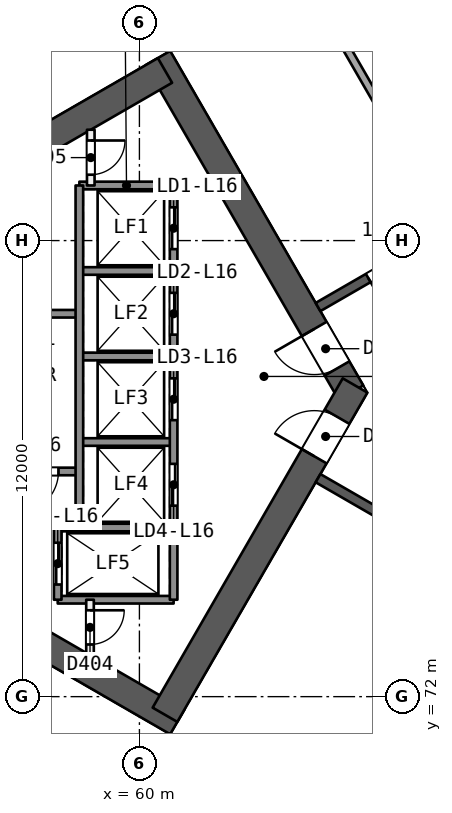
"""IFC4 building model, lengths in metres.
Left out: names, types, materials, properties, quantities, classifications, styles, units other than length and angle.
Written with IfcOpenShell. Run it as: python <this file> out.ifc"""

import sys

from ifc_helpers import new_model, si_unit, direction, frame, frame_2d, origin, place, context, subcontext, project, spatial, rectangle, extrude, element, fill, save


model = new_model("IFC4")
c1 = context("Model", 3, precision=1e-05, world=origin(), true_north=direction((0.0, 1.0)))
c2 = subcontext(c1, "Body", "Model", "MODEL_VIEW")
j1 = project(units=[si_unit("LENGTHUNIT", "METRE"), si_unit("PLANEANGLEUNIT", "RADIAN")], contexts=[c1])
p1 = place(None, origin())
s1 = spatial("IfcSite", under=j1, at=p1, CompositionType="ELEMENT")
p2 = place(p1, origin())
s2 = spatial("IfcBuilding", under=s1, at=p2, CompositionType="ELEMENT")
p3 = place(p2, frame((0.0, 0.0, 72.1)))
s3 = spatial("IfcBuildingStorey", under=s2, at=p3, CompositionType="ELEMENT", Elevation=72.1)
p4 = place(p3, frame((65.567, 80.0, 0.0), z_axis=(0.0, 0.0, 1.0), x_axis=(-0.499988615364, 0.866031976607, 0.0)))
e1 = element("IfcWall", 1, at=p4, inside=s3, PredefinedType="SHEAR", context=c2, shape_type="SweptSolid", body=[
    extrude(rectangle(XDim=10.163, YDim=0.75, at=frame_2d((5.082, 0.0))), origin(), (0.0, 0.0, 1.0), 3.7),
])
p5 = place(p4, frame((0.733, 0.0, 0.0)))
e2 = element("IfcOpeningElement", 2, at=p5, cuts=e1, PredefinedType="OPENING", context=c2, shape_type="SweptSolid", body=[
    extrude(rectangle(XDim=1.2, YDim=2.1, at=frame_2d((0.6, 1.05))), frame((0.0, 0.385, 0.0), z_axis=(0.0, -1.0, 0.0), x_axis=(1.0, 0.0, 0.0)), (0.0, 0.0, 1.0), 0.771),
])
p6 = place(p3, frame((60.673, 88.477, 0.0), z_axis=(0.0, 0.0, 1.0), x_axis=(-0.8660248072, -0.500001033313, 0.0)))
e3 = element("IfcWall", 3, at=p6, inside=s3, PredefinedType="SHEAR", context=c2, shape_type="SweptSolid", body=[
    extrude(rectangle(XDim=13.958, YDim=0.75, at=frame_2d((6.979, 0.0))), origin(), (0.0, 0.0, 1.0), 3.7),
])
p7 = place(p3, frame((48.772, 78.394, 0.0), z_axis=(0.0, 0.0, 1.0), x_axis=(0.866028339916, -0.499994914436, 0.0)))
e4 = element("IfcWall", 4, at=p7, inside=s3, PredefinedType="SHEAR", context=c2, shape_type="SweptSolid", body=[
    extrude(rectangle(XDim=14.117, YDim=0.75, at=frame_2d((7.059, 0.0))), origin(), (0.0, 0.0, 1.0), 3.7),
])
p8 = place(p3, frame((60.673, 71.523, 0.0), z_axis=(0.0, 0.0, 1.0), x_axis=(0.499997052475, 0.866027105532, 0.0)))
e5 = element("IfcWall", 5, at=p8, inside=s3, PredefinedType="SHEAR", context=c2, shape_type="SweptSolid", body=[
    extrude(rectangle(XDim=10.005, YDim=0.75, at=frame_2d((5.002, 0.0))), origin(), (0.0, 0.0, 1.0), 3.7),
])
p9 = place(p8, frame((7.855, 0.0, 0.0)))
e6 = element("IfcOpeningElement", 6, at=p9, cuts=e5, PredefinedType="OPENING", context=c2, shape_type="SweptSolid", body=[
    extrude(rectangle(XDim=1.2, YDim=2.1, at=frame_2d((0.6, 1.05))), frame((0.0, 0.385, 0.0), z_axis=(0.0, -1.0, 0.0), x_axis=(1.0, 0.0, 0.0)), (0.0, 0.0, 1.0), 0.771),
])
p10 = place(p3, frame((78.2, 90.046, 0.0), z_axis=(0.0, 0.0, 1.0), x_axis=(-0.866026492143, -0.499998114903, 0.0)))
e7 = element("IfcWall", 7, at=p10, inside=s3, PredefinedType="SHEAR", context=c2, shape_type="SweptSolid", body=[
    extrude(rectangle(XDim=15.588, YDim=0.25, at=frame_2d((7.794, 0.0))), origin(), (0.0, 0.0, 1.0), 3.2),
])
p11 = place(p10, frame((4.718, 0.0, 0.0)))
e8 = element("IfcOpeningElement", 8, at=p11, cuts=e7, PredefinedType="OPENING", context=c2, shape_type="SweptSolid", body=[
    extrude(rectangle(XDim=1.0, YDim=2.1, at=frame_2d((0.5, 1.05))), frame((0.0, 0.135, 0.0), z_axis=(0.0, -1.0, 0.0), x_axis=(1.0, 0.0, 0.0)), (0.0, 0.0, 1.0), 0.271),
])
p12 = place(p10, frame((9.785, 0.0, 0.0)))
e9 = element("IfcOpeningElement", 9, at=p12, cuts=e7, PredefinedType="OPENING", context=c2, shape_type="SweptSolid", body=[
    extrude(rectangle(XDim=1.1, YDim=2.1, at=frame_2d((0.55, 1.05))), frame((0.0, 0.135, 0.0), z_axis=(0.0, -1.0, 0.0), x_axis=(1.0, 0.0, 0.0)), (0.0, 0.0, 1.0), 0.271),
])
p13 = place(p10, frame((13.062, 0.0, 0.0)))
e10 = element("IfcOpeningElement", 10, at=p13, cuts=e7, PredefinedType="OPENING", context=c2, shape_type="SweptSolid", body=[
    extrude(rectangle(XDim=1.0, YDim=2.1, at=frame_2d((0.5, 1.05))), frame((0.0, 0.135, 0.0), z_axis=(0.0, -1.0, 0.0), x_axis=(1.0, 0.0, 0.0)), (0.0, 0.0, 1.0), 0.271),
])
p14 = place(p3, frame((64.7, 77.748, 0.0), z_axis=(0.0, 0.0, 1.0), x_axis=(0.866026492143, -0.499998114903, 0.0)))
e11 = element("IfcWall", 11, at=p14, inside=s3, PredefinedType="SHEAR", context=c2, shape_type="SweptSolid", body=[
    extrude(rectangle(XDim=15.588, YDim=0.25, at=frame_2d((7.794, 0.0))), origin(), (0.0, 0.0, 1.0), 3.2),
])
p15 = place(p14, frame((2.306, 0.0, 0.0)))
e12 = element("IfcOpeningElement", 12, at=p15, cuts=e11, PredefinedType="OPENING", context=c2, shape_type="SweptSolid", body=[
    extrude(rectangle(XDim=1.0, YDim=2.1, at=frame_2d((0.5, 1.05))), frame((0.0, 0.135, 0.0), z_axis=(0.0, -1.0, 0.0), x_axis=(1.0, 0.0, 0.0)), (0.0, 0.0, 1.0), 0.271),
])
p16 = place(p14, frame((8.003, 0.0, 0.0)))
e13 = element("IfcOpeningElement", 13, at=p16, cuts=e11, PredefinedType="OPENING", context=c2, shape_type="SweptSolid", body=[
    extrude(rectangle(XDim=1.1, YDim=2.1, at=frame_2d((0.55, 1.05))), frame((0.0, 0.135, 0.0), z_axis=(0.0, -1.0, 0.0), x_axis=(1.0, 0.0, 0.0)), (0.0, 0.0, 1.0), 0.271),
])
p17 = place(p14, frame((9.871, 0.0, 0.0)))
e14 = element("IfcOpeningElement", 14, at=p17, cuts=e11, PredefinedType="OPENING", context=c2, shape_type="SweptSolid", body=[
    extrude(rectangle(XDim=1.0, YDim=2.1, at=frame_2d((0.5, 1.05))), frame((0.0, 0.135, 0.0), z_axis=(0.0, -1.0, 0.0), x_axis=(1.0, 0.0, 0.0)), (0.0, 0.0, 1.0), 0.271),
])
p18 = place(p3, frame((61.51, 95.884, 0.0), z_axis=(0.0, 0.0, 1.0), x_axis=(0.499993171696, -0.866029346071, 0.0)))
e15 = element("IfcWall", 15, at=p18, inside=s3, PredefinedType="PARTITIONING", context=c2, shape_type="SweptSolid", body=[
    extrude(rectangle(XDim=13.401, YDim=0.2, at=frame_2d((6.701, 0.0))), origin(), (0.0, 0.0, 1.0), 3.2),
])
p19 = place(p3, frame((62.859, 63.337, 0.0), z_axis=(0.0, 0.0, 1.0), x_axis=(0.500016660921, 0.866015784384, 0.0)))
e16 = element("IfcWall", 16, at=p19, inside=s3, PredefinedType="PARTITIONING", context=c2, shape_type="SweptSolid", body=[
    extrude(rectangle(XDim=9.338, YDim=0.2, at=frame_2d((4.669, 0.0))), origin(), (0.0, 0.0, 1.0), 3.2),
])
p20 = place(p3, frame((66.099, 61.466, 0.0), z_axis=(0.0, 0.0, 1.0), x_axis=(0.500006835139, 0.866021457479, 0.0)))
e17 = element("IfcWall", 17, at=p20, inside=s3, PredefinedType="PARTITIONING", context=c2, shape_type="SweptSolid", body=[
    extrude(rectangle(XDim=13.401, YDim=0.2, at=frame_2d((6.701, 0.0))), origin(), (0.0, 0.0, 1.0), 3.2),
])
p21 = place(p3, frame((38.962, 83.038, 0.0), z_axis=(0.0, 0.0, 1.0), x_axis=(0.866024483997, 0.500001593116, 0.0)))
e18 = element("IfcWall", 18, at=p21, inside=s3, PredefinedType="SOLIDWALL", context=c2, shape_type="SweptSolid", body=[
    extrude(rectangle(XDim=59.381, YDim=0.3, at=frame_2d((29.69, 0.0))), origin(), (0.0, 0.0, 1.0), 3.2),
])
p22 = place(p21, frame((27.399, 0.0, 0.0)))
e19 = element("IfcOpeningElement", 19, at=p22, cuts=e18, PredefinedType="OPENING", context=c2, shape_type="SweptSolid", body=[
    extrude(rectangle(XDim=2.4, YDim=2.4, at=frame_2d((1.2, 1.2))), frame((0.0, 0.161, 0.0), z_axis=(0.0, -1.0, 0.0), x_axis=(1.0, 0.0, 0.0)), (0.0, 0.0, 1.0), 0.321),
])
p23 = place(p21, frame((22.723, 0.0, 0.0)))
e20 = element("IfcOpeningElement", 20, at=p23, cuts=e18, PredefinedType="OPENING", context=c2, shape_type="SweptSolid", body=[
    extrude(rectangle(XDim=2.4, YDim=2.4, at=frame_2d((1.2, 1.2))), frame((0.0, 0.161, 0.0), z_axis=(0.0, -1.0, 0.0), x_axis=(1.0, 0.0, 0.0)), (0.0, 0.0, 1.0), 0.321),
])
p24 = place(p21, frame((10.887, 0.0, 0.0)))
e21 = element("IfcOpeningElement", 21, at=p24, cuts=e18, PredefinedType="OPENING", context=c2, shape_type="SweptSolid", body=[
    extrude(rectangle(XDim=2.4, YDim=2.4, at=frame_2d((1.2, 1.2))), frame((0.0, 0.161, 0.0), z_axis=(0.0, -1.0, 0.0), x_axis=(1.0, 0.0, 0.0)), (0.0, 0.0, 1.0), 0.321),
])
p25 = place(p21, frame((44.158, 0.0, 0.0)))
e22 = element("IfcOpeningElement", 22, at=p25, cuts=e18, PredefinedType="OPENING", context=c2, shape_type="SweptSolid", body=[
    extrude(rectangle(XDim=2.4, YDim=2.4, at=frame_2d((1.2, 1.2))), frame((0.0, 0.161, 0.0), z_axis=(0.0, -1.0, 0.0), x_axis=(1.0, 0.0, 0.0)), (0.0, 0.0, 1.0), 0.321),
])
p26 = place(p3, frame((90.388, 47.271, 0.0), z_axis=(0.0, 0.0, 1.0), x_axis=(-0.866024483997, 0.500001593116, 0.0)))
e23 = element("IfcWall", 23, at=p26, inside=s3, PredefinedType="SOLIDWALL", context=c2, shape_type="SweptSolid", body=[
    extrude(rectangle(XDim=59.381, YDim=0.3, at=frame_2d((29.69, 0.0))), origin(), (0.0, 0.0, 1.0), 3.2),
])
p27 = place(p26, frame((28.802, 0.0, 0.0)))
e24 = element("IfcOpeningElement", 24, at=p27, cuts=e23, PredefinedType="OPENING", context=c2, shape_type="SweptSolid", body=[
    extrude(rectangle(XDim=2.4, YDim=2.4, at=frame_2d((1.2, 1.2))), frame((0.0, 0.161, 0.0), z_axis=(0.0, -1.0, 0.0), x_axis=(1.0, 0.0, 0.0)), (0.0, 0.0, 1.0), 0.321),
])
p28 = place(p26, frame((33.479, 0.0, 0.0)))
e25 = element("IfcOpeningElement", 25, at=p28, cuts=e23, PredefinedType="OPENING", context=c2, shape_type="SweptSolid", body=[
    extrude(rectangle(XDim=2.4, YDim=2.4, at=frame_2d((1.2, 1.2))), frame((0.0, 0.161, 0.0), z_axis=(0.0, -1.0, 0.0), x_axis=(1.0, 0.0, 0.0)), (0.0, 0.0, 1.0), 0.321),
])
p29 = place(p26, frame((46.066, 0.0, 0.0)))
e26 = element("IfcOpeningElement", 26, at=p29, cuts=e23, PredefinedType="OPENING", context=c2, shape_type="SweptSolid", body=[
    extrude(rectangle(XDim=2.4, YDim=2.4, at=frame_2d((1.2, 1.2))), frame((0.0, 0.161, 0.0), z_axis=(0.0, -1.0, 0.0), x_axis=(1.0, 0.0, 0.0)), (0.0, 0.0, 1.0), 0.321),
])
p30 = place(p26, frame((12.823, 0.0, 0.0)))
e27 = element("IfcOpeningElement", 27, at=p30, cuts=e23, PredefinedType="OPENING", context=c2, shape_type="SweptSolid", body=[
    extrude(rectangle(XDim=2.4, YDim=2.4, at=frame_2d((1.2, 1.2))), frame((0.0, 0.161, 0.0), z_axis=(0.0, -1.0, 0.0), x_axis=(1.0, 0.0, 0.0)), (0.0, 0.0, 1.0), 0.321),
])
for number, where, z_axis, x_axis in (
    (28, (60.9, 85.45, 0.0), (0.0, 0.0, 1.0), (-1.0, 0.0, 0.0)),
    (29, (60.9, 83.2, 0.0), (0.0, 0.0, 1.0), (-1.0, 0.0, 0.0)),
):
    element("IfcWall", number, at=place(p3, frame(where, z_axis=z_axis, x_axis=x_axis)), inside=s3, PredefinedType="SOLIDWALL", context=c2, shape_type="SweptSolid", body=[
        extrude(rectangle(XDim=2.48, YDim=0.2, at=frame_2d((1.24, 0.0))), origin(), (0.0, 0.0, 1.0), 3.2),
    ])
p31 = place(p3, frame((58.42, 82.075, 0.0), z_axis=(0.0, 0.0, 1.0), x_axis=(-1.0, 0.0, 0.0)))
e30 = element("IfcWall", 30, at=p31, inside=s3, PredefinedType="SOLIDWALL", context=c2, shape_type="SweptSolid", body=[
    extrude(rectangle(XDim=7.7, YDim=0.2, at=frame_2d((3.85, 0.0))), origin(), (0.0, 0.0, 1.0), 3.2),
])
for number, where, z_axis, x_axis in (
    (31, (60.9, 80.95, 0.0), (0.0, 0.0, 1.0), (-1.0, 0.0, 0.0)),
    (32, (60.9, 78.7, 0.0), (0.0, 0.0, 1.0), (-1.0, 0.0, 0.0)),
):
    element("IfcWall", number, at=place(p3, frame(where, z_axis=z_axis, x_axis=x_axis)), inside=s3, PredefinedType="SOLIDWALL", context=c2, shape_type="SweptSolid", body=[
        extrude(rectangle(XDim=2.48, YDim=0.2, at=frame_2d((1.24, 0.0))), origin(), (0.0, 0.0, 1.0), 3.2),
    ])
p32 = place(p3, frame((58.42, 77.925, 0.0), z_axis=(0.0, 0.0, 1.0), x_axis=(-1.0, 0.0, 0.0)))
e33 = element("IfcWall", 33, at=p32, inside=s3, PredefinedType="SOLIDWALL", context=c2, shape_type="SweptSolid", body=[
    extrude(rectangle(XDim=7.7, YDim=0.2, at=frame_2d((3.85, 0.0))), origin(), (0.0, 0.0, 1.0), 3.2),
])
p33 = place(p32, frame((0.55, 0.0, 0.0)))
e34 = element("IfcOpeningElement", 34, at=p33, cuts=e33, PredefinedType="OPENING", context=c2, shape_type="SweptSolid", body=[
    extrude(rectangle(XDim=1.1, YDim=2.1, at=frame_2d((0.55, 1.05))), frame((0.0, 0.11, 0.0), z_axis=(0.0, -1.0, 0.0), x_axis=(1.0, 0.0, 0.0)), (0.0, 0.0, 1.0), 0.221),
])
for number, where, z_axis, x_axis in (
    (35, (60.9, 76.45, 0.0), (0.0, 0.0, 1.0), (-1.0, 0.0, 0.0)),
    (36, (60.9, 74.55, 0.0), (0.0, 0.0, 1.0), (-1.0, 0.0, 0.0)),
):
    element("IfcWall", number, at=place(p3, frame(where, z_axis=z_axis, x_axis=x_axis)), inside=s3, PredefinedType="SOLIDWALL", context=c2, shape_type="SweptSolid", body=[
        extrude(rectangle(XDim=3.05, YDim=0.2, at=frame_2d((1.525, 0.0))), origin(), (0.0, 0.0, 1.0), 3.2),
    ])
p34 = place(p3, frame((60.9, 85.45, 0.0), z_axis=(0.0, 0.0, 1.0), x_axis=(0.0, -1.0, 0.0)))
e37 = element("IfcWall", 37, at=p34, inside=s3, PredefinedType="SOLIDWALL", context=c2, shape_type="SweptSolid", body=[
    extrude(rectangle(XDim=10.9, YDim=0.2, at=frame_2d((5.45, 0.0))), origin(), (0.0, 0.0, 1.0), 3.2),
])
p35 = place(p34, frame((0.575, 0.0, 0.0)))
e38 = element("IfcOpeningElement", 38, at=p35, cuts=e37, PredefinedType="OPENING", context=c2, shape_type="SweptSolid", body=[
    extrude(rectangle(XDim=1.1, YDim=2.1, at=frame_2d((0.55, 1.05))), frame((0.0, 0.11, 0.0), z_axis=(0.0, -1.0, 0.0), x_axis=(1.0, 0.0, 0.0)), (0.0, 0.0, 1.0), 0.221),
])
p36 = place(p34, frame((2.825, 0.0, 0.0)))
e39 = element("IfcOpeningElement", 39, at=p36, cuts=e37, PredefinedType="OPENING", context=c2, shape_type="SweptSolid", body=[
    extrude(rectangle(XDim=1.1, YDim=2.1, at=frame_2d((0.55, 1.05))), frame((0.0, 0.11, 0.0), z_axis=(0.0, -1.0, 0.0), x_axis=(1.0, 0.0, 0.0)), (0.0, 0.0, 1.0), 0.221),
])
p37 = place(p34, frame((5.075, 0.0, 0.0)))
e40 = element("IfcOpeningElement", 40, at=p37, cuts=e37, PredefinedType="OPENING", context=c2, shape_type="SweptSolid", body=[
    extrude(rectangle(XDim=1.1, YDim=2.1, at=frame_2d((0.55, 1.05))), frame((0.0, 0.11, 0.0), z_axis=(0.0, -1.0, 0.0), x_axis=(1.0, 0.0, 0.0)), (0.0, 0.0, 1.0), 0.221),
])
p38 = place(p34, frame((7.325, 0.0, 0.0)))
e41 = element("IfcOpeningElement", 41, at=p38, cuts=e37, PredefinedType="OPENING", context=c2, shape_type="SweptSolid", body=[
    extrude(rectangle(XDim=1.1, YDim=2.1, at=frame_2d((0.55, 1.05))), frame((0.0, 0.11, 0.0), z_axis=(0.0, -1.0, 0.0), x_axis=(1.0, 0.0, 0.0)), (0.0, 0.0, 1.0), 0.221),
])
p39 = place(p3, frame((58.72, 86.917, 0.0), z_axis=(0.0, 0.0, 1.0), x_axis=(0.0, -1.0, 0.0)))
e42 = element("IfcWall", 42, at=p39, inside=s3, PredefinedType="PARTITIONING", context=c2, shape_type="SweptSolid", body=[
    extrude(rectangle(XDim=1.467, YDim=0.2, at=frame_2d((0.733, 0.0))), origin(), (0.0, 0.0, 1.0), 3.2),
])
p40 = place(p39, frame((0.283, 0.0, 0.0)))
e43 = element("IfcOpeningElement", 43, at=p40, cuts=e42, PredefinedType="OPENING", context=c2, shape_type="SweptSolid", body=[
    extrude(rectangle(XDim=0.9, YDim=2.1, at=frame_2d((0.45, 1.05))), frame((0.0, 0.11, 0.0), z_axis=(0.0, -1.0, 0.0), x_axis=(1.0, 0.0, 0.0)), (0.0, 0.0, 1.0), 0.221),
])
p41 = place(p3, frame((58.7, 74.55, 0.0), z_axis=(0.0, 0.0, 1.0), x_axis=(0.0, -1.0, 0.0)))
e44 = element("IfcWall", 44, at=p41, inside=s3, PredefinedType="PARTITIONING", context=c2, shape_type="SweptSolid", body=[
    extrude(rectangle(XDim=1.455, YDim=0.2, at=frame_2d((0.728, 0.0))), origin(), (0.0, 0.0, 1.0), 3.2),
])
p42 = place(p41, frame((0.278, 0.0, 0.0)))
e45 = element("IfcOpeningElement", 45, at=p42, cuts=e44, PredefinedType="OPENING", context=c2, shape_type="SweptSolid", body=[
    extrude(rectangle(XDim=0.9, YDim=2.1, at=frame_2d((0.45, 1.05))), frame((0.0, 0.11, 0.0), z_axis=(0.0, -1.0, 0.0), x_axis=(1.0, 0.0, 0.0)), (0.0, 0.0, 1.0), 0.221),
])
p43 = place(p3, frame((58.42, 85.45, 0.0), z_axis=(0.0, 0.0, 1.0), x_axis=(0.0, -1.0, 0.0)))
e46 = element("IfcWall", 46, at=p43, inside=s3, PredefinedType="SOLIDWALL", context=c2, shape_type="SweptSolid", body=[
    extrude(rectangle(XDim=9.0, YDim=0.2, at=frame_2d((4.5, 0.0))), origin(), (0.0, 0.0, 1.0), 3.2),
])
p44 = place(p3, frame((57.85, 76.45, 0.0), z_axis=(0.0, 0.0, 1.0), x_axis=(0.0, -1.0, 0.0)))
e47 = element("IfcWall", 47, at=p44, inside=s3, PredefinedType="SOLIDWALL", context=c2, shape_type="SweptSolid", body=[
    extrude(rectangle(XDim=1.9, YDim=0.2, at=frame_2d((0.95, 0.0))), origin(), (0.0, 0.0, 1.0), 3.2),
])
p45 = place(p44, frame((0.4, 0.0, 0.0)))
e48 = element("IfcOpeningElement", 48, at=p45, cuts=e47, PredefinedType="OPENING", context=c2, shape_type="SweptSolid", body=[
    extrude(rectangle(XDim=1.1, YDim=2.1, at=frame_2d((0.55, 1.05))), frame((0.0, 0.11, 0.0), z_axis=(0.0, -1.0, 0.0), x_axis=(1.0, 0.0, 0.0)), (0.0, 0.0, 1.0), 0.221),
])
p46 = place(p13, origin())
e49 = element("IfcDoor", 49, at=p46, inside=s3, OperationType="SINGLE_SWING_RIGHT", PredefinedType="NOTDEFINED", context=c2, shape_type="SweptSolid", body=[
    extrude(rectangle(XDim=1.0, YDim=2.1, at=frame_2d((0.5, 1.05))), frame((0.0, 0.025, 0.0), z_axis=(0.0, -1.0, 0.0), x_axis=(1.0, 0.0, 0.0)), (0.0, 0.0, 1.0), 0.05),
])
fill(e10, e49)
p47 = place(p5, origin())
e50 = element("IfcDoor", 50, at=p47, inside=s3, OperationType="SINGLE_SWING_RIGHT", PredefinedType="NOTDEFINED", context=c2, shape_type="SweptSolid", body=[
    extrude(rectangle(XDim=1.2, YDim=2.1, at=frame_2d((0.6, 1.05))), frame((0.0, 0.025, 0.0), z_axis=(0.0, -1.0, 0.0), x_axis=(1.0, 0.0, 0.0)), (0.0, 0.0, 1.0), 0.05),
])
fill(e2, e50)
p48 = place(p9, origin())
e51 = element("IfcDoor", 51, at=p48, inside=s3, OperationType="SINGLE_SWING_LEFT", PredefinedType="NOTDEFINED", context=c2, shape_type="SweptSolid", body=[
    extrude(rectangle(XDim=1.2, YDim=2.1, at=frame_2d((0.6, 1.05))), frame((0.0, 0.025, 0.0), z_axis=(0.0, -1.0, 0.0), x_axis=(1.0, 0.0, 0.0)), (0.0, 0.0, 1.0), 0.05),
])
fill(e6, e51)
p49 = place(p35, origin())
e52 = element("IfcDoor", 52, at=p49, inside=s3, OperationType="SLIDING_TO_RIGHT", PredefinedType="NOTDEFINED", context=c2, shape_type="SweptSolid", body=[
    extrude(rectangle(XDim=1.1, YDim=2.1, at=frame_2d((0.55, 1.05))), frame((0.0, 0.025, 0.0), z_axis=(0.0, -1.0, 0.0), x_axis=(1.0, 0.0, 0.0)), (0.0, 0.0, 1.0), 0.05),
])
fill(e38, e52)
p50 = place(p36, origin())
e53 = element("IfcDoor", 53, at=p50, inside=s3, OperationType="SLIDING_TO_LEFT", PredefinedType="NOTDEFINED", context=c2, shape_type="SweptSolid", body=[
    extrude(rectangle(XDim=1.1, YDim=2.1, at=frame_2d((0.55, 1.05))), frame((0.0, 0.025, 0.0), z_axis=(0.0, -1.0, 0.0), x_axis=(1.0, 0.0, 0.0)), (0.0, 0.0, 1.0), 0.05),
])
fill(e39, e53)
p51 = place(p37, origin())
e54 = element("IfcDoor", 54, at=p51, inside=s3, OperationType="SLIDING_TO_RIGHT", PredefinedType="NOTDEFINED", context=c2, shape_type="SweptSolid", body=[
    extrude(rectangle(XDim=1.1, YDim=2.1, at=frame_2d((0.55, 1.05))), frame((0.0, 0.025, 0.0), z_axis=(0.0, -1.0, 0.0), x_axis=(1.0, 0.0, 0.0)), (0.0, 0.0, 1.0), 0.05),
])
fill(e40, e54)
p52 = place(p38, origin())
e55 = element("IfcDoor", 55, at=p52, inside=s3, OperationType="SLIDING_TO_LEFT", PredefinedType="NOTDEFINED", context=c2, shape_type="SweptSolid", body=[
    extrude(rectangle(XDim=1.1, YDim=2.1, at=frame_2d((0.55, 1.05))), frame((0.0, 0.025, 0.0), z_axis=(0.0, -1.0, 0.0), x_axis=(1.0, 0.0, 0.0)), (0.0, 0.0, 1.0), 0.05),
])
fill(e41, e55)
p53 = place(p45, origin())
e56 = element("IfcDoor", 56, at=p53, inside=s3, OperationType="SLIDING_TO_RIGHT", PredefinedType="NOTDEFINED", context=c2, shape_type="SweptSolid", body=[
    extrude(rectangle(XDim=1.1, YDim=2.1, at=frame_2d((0.55, 1.05))), frame((0.0, 0.025, 0.0), z_axis=(0.0, -1.0, 0.0), x_axis=(1.0, 0.0, 0.0)), (0.0, 0.0, 1.0), 0.05),
])
fill(e48, e56)
p54 = place(p42, origin())
e57 = element("IfcDoor", 57, at=p54, inside=s3, OperationType="SINGLE_SWING_LEFT", PredefinedType="NOTDEFINED", context=c2, shape_type="SweptSolid", body=[
    extrude(rectangle(XDim=0.9, YDim=2.1, at=frame_2d((0.45, 1.05))), frame((0.0, 0.025, 0.0), z_axis=(0.0, -1.0, 0.0), x_axis=(1.0, 0.0, 0.0)), (0.0, 0.0, 1.0), 0.05),
])
fill(e45, e57)
p55 = place(p40, origin())
e58 = element("IfcDoor", 58, at=p55, inside=s3, OperationType="SINGLE_SWING_LEFT", PredefinedType="NOTDEFINED", context=c2, shape_type="SweptSolid", body=[
    extrude(rectangle(XDim=0.9, YDim=2.1, at=frame_2d((0.45, 1.05))), frame((0.0, 0.025, 0.0), z_axis=(0.0, -1.0, 0.0), x_axis=(1.0, 0.0, 0.0)), (0.0, 0.0, 1.0), 0.05),
])
fill(e43, e58)
p56 = place(p33, origin())
e59 = element("IfcDoor", 59, at=p56, inside=s3, OperationType="SINGLE_SWING_RIGHT", PredefinedType="NOTDEFINED", context=c2, shape_type="SweptSolid", body=[
    extrude(rectangle(XDim=1.1, YDim=2.1, at=frame_2d((0.55, 1.05))), frame((0.0, 0.025, 0.0), z_axis=(0.0, -1.0, 0.0), x_axis=(1.0, 0.0, 0.0)), (0.0, 0.0, 1.0), 0.05),
])
fill(e34, e59)
save(model, sys.argv[1])
